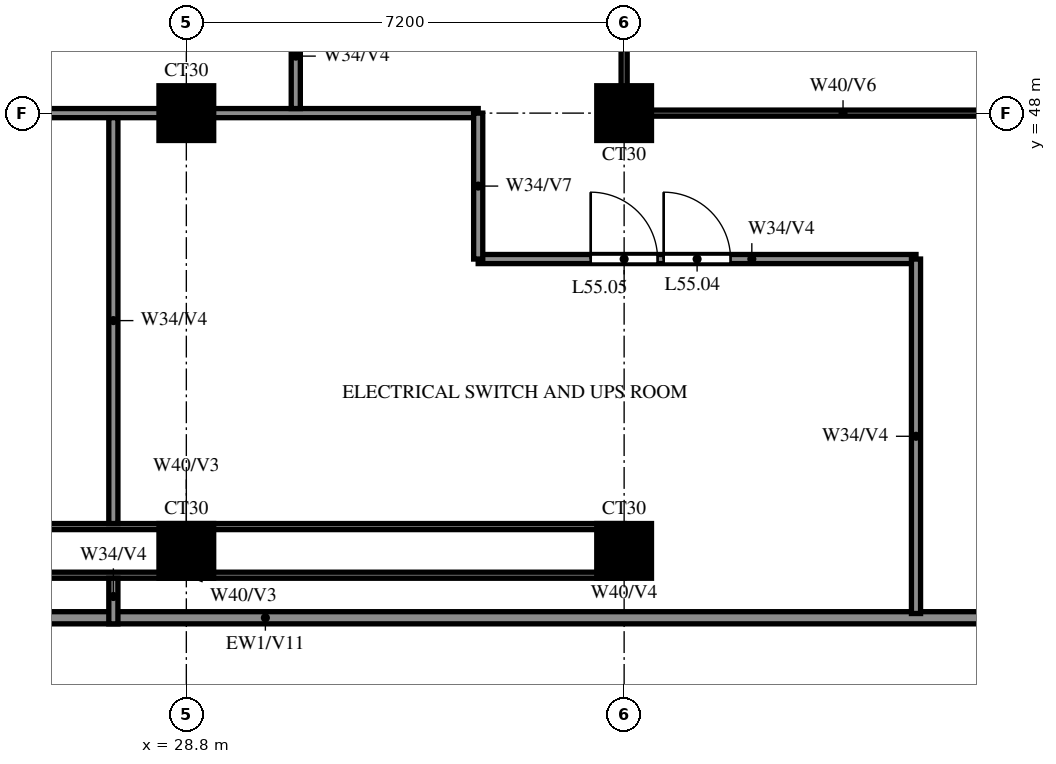
"""IFC4 building model, lengths in metres.
Left out: names, types, materials, properties, quantities, classifications, styles, units other than length and angle.
Written with IfcOpenShell. Run it as: python <this file> out.ifc"""

import sys

from ifc_helpers import new_model, si_unit, direction, frame, frame_2d, origin, origin_2d, place, context, subcontext, project, spatial, rectangle, extrude, source, transform, mapped, element, fill, save


model = new_model("IFC4")
c1 = context("Model", 3, precision=1e-05, world=origin(), true_north=direction((0.0, 1.0)))
c2 = subcontext(c1, "Body", "Model", "MODEL_VIEW")
j1 = project(units=[si_unit("LENGTHUNIT", "METRE"), si_unit("PLANEANGLEUNIT", "RADIAN")], contexts=[c1])
p1 = place(None, origin())
s1 = spatial("IfcSite", under=j1, at=p1, CompositionType="ELEMENT")
p2 = place(p1, origin())
s2 = spatial("IfcBuilding", under=s1, at=p2, CompositionType="ELEMENT")
p3 = place(p2, frame((0.0, 0.0, 206.0)))
s3 = spatial("IfcBuildingStorey", under=s2, at=p3, CompositionType="ELEMENT", Elevation=206.0)
m1 = source(origin(), c2, "Body", "SweptSolid", [
    extrude(rectangle(XDim=0.9, YDim=0.9, at=origin_2d()), origin(), (0.0, 0.0, 1.0), 5.22),
])
for number, where, z_axis, x_axis in (
    (1, (28.8, 40.8, 0.0), (0.0, 0.0, 1.0), (1.0, 0.0, 0.0)),
    (2, (36.0, 40.8, 0.0), (0.0, 0.0, 1.0), (1.0, 0.0, 0.0)),
    (3, (28.8, 48.0, 0.0), (0.0, 0.0, 1.0), (1.0, 0.0, 0.0)),
    (4, (36.0, 48.0, 0.0), (0.0, 0.0, 1.0), (1.0, 0.0, 0.0)),
):
    element("IfcColumn", number, at=place(p3, frame(where, z_axis=z_axis, x_axis=x_axis)), inside=s3, PredefinedType="COLUMN", context=c2, shape_type="MappedRepresentation", body=[
        mapped(m1, transform((0.0, 0.0, 0.0))),
    ])
p4 = place(p3, frame((18.2, 39.7, 0.0), z_axis=(0.0, 0.0, 1.0), x_axis=(1.0, 0.0, 0.0)))
e5 = element("IfcWall", 5, at=p4, inside=s3, PredefinedType="SOLIDWALL", context=c2, shape_type="SweptSolid", body=[
    extrude(rectangle(XDim=23.8, YDim=0.2, at=frame_2d((11.9, 0.0))), origin(), (0.0, 0.0, 1.0), 5.22),
])
for number, where, z_axis, x_axis in (
    (6, (21.6, 40.4, 0.0), (0.0, 0.0, 1.0), (1.0, 0.0, 0.0)),
    (7, (21.6, 41.2, 0.0), (0.0, 0.0, 1.0), (1.0, 0.0, 0.0)),
):
    element("IfcWall", number, at=place(p3, frame(where, z_axis=z_axis, x_axis=x_axis)), inside=s3, PredefinedType="PARTITIONING", context=c2, shape_type="SweptSolid", body=[
        extrude(rectangle(XDim=14.4, YDim=0.1, at=frame_2d((7.2, 0.0))), origin(), (0.0, 0.0, 1.0), 3.72),
    ])
p5 = place(p3, frame((33.6, 45.6, 0.0), z_axis=(0.0, 0.0, 1.0), x_axis=(1.0, 0.0, 0.0)))
e8 = element("IfcWall", 8, at=p5, inside=s3, PredefinedType="PARTITIONING", context=c2, shape_type="SweptSolid", body=[
    extrude(rectangle(XDim=7.2, YDim=0.15, at=frame_2d((3.6, 0.0))), origin(), (0.0, 0.0, 1.0), 5.22),
])
p6 = place(p5, frame((3.05, 0.0, 0.0)))
e9 = element("IfcOpeningElement", 9, at=p6, cuts=e8, PredefinedType="OPENING", context=c2, shape_type="SweptSolid", body=[
    extrude(rectangle(XDim=1.1, YDim=2.1, at=frame_2d((0.55, 1.05))), frame((0.0, 0.085, 0.0), z_axis=(0.0, -1.0, 0.0), x_axis=(1.0, 0.0, 0.0)), (0.0, 0.0, 1.0), 0.17),
])
p7 = place(p5, frame((1.85, 0.0, 0.0)))
e10 = element("IfcOpeningElement", 10, at=p7, cuts=e8, PredefinedType="OPENING", context=c2, shape_type="SweptSolid", body=[
    extrude(rectangle(XDim=1.1, YDim=2.1, at=frame_2d((0.55, 1.05))), frame((0.0, 0.085, 0.0), z_axis=(0.0, -1.0, 0.0), x_axis=(1.0, 0.0, 0.0)), (0.0, 0.0, 1.0), 0.17),
])
p8 = place(p3, frame((36.0, 48.0, 0.0), z_axis=(0.0, 0.0, 1.0), x_axis=(1.0, 0.0, 0.0)))
e11 = element("IfcWall", 11, at=p8, inside=s3, PredefinedType="PARTITIONING", context=c2, shape_type="SweptSolid", body=[
    extrude(rectangle(XDim=7.2, YDim=0.1, at=frame_2d((3.6, 0.0))), origin(), (0.0, 0.0, 1.0), 4.32),
])
p9 = place(p3, frame((15.4, 48.0, 0.0), z_axis=(0.0, 0.0, 1.0), x_axis=(1.0, 0.0, 0.0)))
e12 = element("IfcWall", 12, at=p9, inside=s3, PredefinedType="PARTITIONING", context=c2, shape_type="SweptSolid", body=[
    extrude(rectangle(XDim=18.2, YDim=0.15, at=frame_2d((9.1, 0.0))), origin(), (0.0, 0.0, 1.0), 3.72),
])
p10 = place(p9, frame((4.5, 0.0, 0.0)))
e13 = element("IfcOpeningElement", 13, at=p10, cuts=e12, PredefinedType="OPENING", context=c2, shape_type="SweptSolid", body=[
    extrude(rectangle(XDim=1.1, YDim=2.1, at=frame_2d((0.55, 1.05))), frame((0.0, 0.085, 0.0), z_axis=(0.0, -1.0, 0.0), x_axis=(1.0, 0.0, 0.0)), (0.0, 0.0, 1.0), 0.17),
])
p11 = place(p3, frame((27.6, 39.6, 0.0), z_axis=(0.0, 0.0, 1.0), x_axis=(0.0, 1.0, 0.0)))
e14 = element("IfcWall", 14, at=p11, inside=s3, PredefinedType="PARTITIONING", context=c2, shape_type="SweptSolid", body=[
    extrude(rectangle(XDim=0.75, YDim=0.15, at=frame_2d((0.375, 0.0))), origin(), (0.0, 0.0, 1.0), 5.22),
])
p12 = place(p3, frame((27.6, 41.25, 0.0), z_axis=(0.0, 0.0, 1.0), x_axis=(0.0, 1.0, 0.0)))
e15 = element("IfcWall", 15, at=p12, inside=s3, PredefinedType="PARTITIONING", context=c2, shape_type="SweptSolid", body=[
    extrude(rectangle(XDim=6.675, YDim=0.15, at=frame_2d((3.337, 0.0))), origin(), (0.0, 0.0, 1.0), 5.22),
])
p13 = place(p3, frame((30.6, 48.075, 0.0), z_axis=(0.0, 0.0, 1.0), x_axis=(0.0, 1.0, 0.0)))
e16 = element("IfcWall", 16, at=p13, inside=s3, PredefinedType="PARTITIONING", context=c2, shape_type="SweptSolid", body=[
    extrude(rectangle(XDim=1.725, YDim=0.15, at=frame_2d((0.863, 0.0))), origin(), (0.0, 0.0, 1.0), 5.22),
])
p14 = place(p3, frame((33.6, 45.6, 0.0), z_axis=(0.0, 0.0, 1.0), x_axis=(0.0, 1.0, 0.0)))
e17 = element("IfcWall", 17, at=p14, inside=s3, PredefinedType="PARTITIONING", context=c2, shape_type="SweptSolid", body=[
    extrude(rectangle(XDim=2.4, YDim=0.15, at=frame_2d((1.2, 0.0))), origin(), (0.0, 0.0, 1.0), 4.32),
])
p15 = place(p3, frame((36.0, 40.4, 0.0), z_axis=(0.0, 0.0, 1.0), x_axis=(0.0, 1.0, 0.0)))
e18 = element("IfcWall", 18, at=p15, inside=s3, PredefinedType="PARTITIONING", context=c2, shape_type="SweptSolid", body=[
    extrude(rectangle(XDim=0.8, YDim=0.1, at=frame_2d((0.4, 0.0))), origin(), (0.0, 0.0, 1.0), 5.22),
])
p16 = place(p3, frame((36.0, 48.0, 0.0), z_axis=(0.0, 0.0, 1.0), x_axis=(0.0, 1.0, 0.0)))
e19 = element("IfcWall", 19, at=p16, inside=s3, PredefinedType="PARTITIONING", context=c2, shape_type="SweptSolid", body=[
    extrude(rectangle(XDim=14.4, YDim=0.1, at=frame_2d((7.2, 0.0))), origin(), (0.0, 0.0, 1.0), 4.32),
])
p17 = place(p3, frame((40.8, 39.77, 0.0), z_axis=(0.0, 0.0, 1.0), x_axis=(0.0, 1.0, 0.0)))
e20 = element("IfcWall", 20, at=p17, inside=s3, PredefinedType="PARTITIONING", context=c2, shape_type="SweptSolid", body=[
    extrude(rectangle(XDim=5.83, YDim=0.15, at=frame_2d((2.915, 0.0))), origin(), (0.0, 0.0, 1.0), 5.22),
])
p18 = place(p6, origin())
e21 = element("IfcDoor", 21, at=p18, inside=s3, OperationType="SINGLE_SWING_RIGHT", PredefinedType="DOOR", context=c2, shape_type="SweptSolid", body=[
    extrude(rectangle(XDim=1.1, YDim=2.1, at=frame_2d((0.55, 1.05))), frame((0.0, 0.025, 0.0), z_axis=(0.0, -1.0, 0.0), x_axis=(1.0, 0.0, 0.0)), (0.0, 0.0, 1.0), 0.05),
])
fill(e9, e21)
p19 = place(p7, origin())
e22 = element("IfcDoor", 22, at=p19, inside=s3, OperationType="SINGLE_SWING_LEFT", PredefinedType="DOOR", context=c2, shape_type="SweptSolid", body=[
    extrude(rectangle(XDim=1.1, YDim=2.1, at=frame_2d((0.55, 1.05))), frame((0.0, 0.025, 0.0), z_axis=(0.0, -1.0, 0.0), x_axis=(1.0, 0.0, 0.0)), (0.0, 0.0, 1.0), 0.05),
])
fill(e10, e22)
save(model, sys.argv[1])
